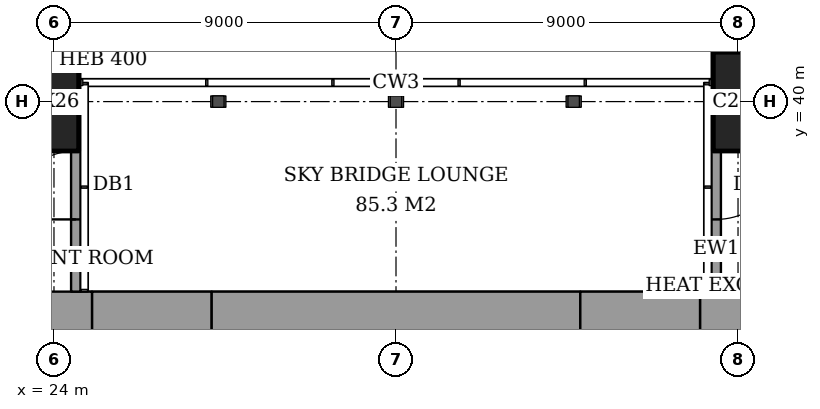
"""IFC4 building model, lengths in metres.
Left out: names, types, materials, properties, quantities, classifications, styles, units other than length and angle.
Written with IfcOpenShell. Run it as: python <this file> out.ifc"""

import sys

from ifc_helpers import new_model, si_unit, direction, frame, frame_2d, origin, origin_2d, place, context, subcontext, project, spatial, rectangle, extrude, element, fill, save


model = new_model("IFC4")
c1 = context("Model", 3, precision=1e-05, world=origin(), true_north=direction((0.0, 1.0)))
c2 = subcontext(c1, "Body", "Model", "MODEL_VIEW")
j1 = project(units=[si_unit("LENGTHUNIT", "METRE"), si_unit("PLANEANGLEUNIT", "RADIAN")], contexts=[c1])
p1 = place(None, origin())
s1 = spatial("IfcSite", under=j1, at=p1, CompositionType="ELEMENT")
p2 = place(p1, origin())
s2 = spatial("IfcBuilding", under=s1, at=p2, CompositionType="ELEMENT")
p3 = place(p2, frame((0.0, 0.0, 177.2)))
s3 = spatial("IfcBuildingStorey", under=s2, at=p3, CompositionType="ELEMENT", Elevation=177.2)
for number, where, z_axis, x_axis in (
    (1, (23.65, 40.0, 0.0), (0.0, 0.0, 1.0), (1.0, 0.0, 0.0)),
    (2, (42.35, 40.0, 0.0), (0.0, 0.0, 1.0), (1.0, 0.0, 0.0)),
):
    element("IfcColumn", number, at=place(p3, frame(where, z_axis=z_axis, x_axis=x_axis)), inside=s3, PredefinedType="COLUMN", context=c2, shape_type="SweptSolid", body=[
        extrude(rectangle(XDim=2.0, YDim=2.6, at=origin_2d()), origin(), (0.0, 0.0, 1.0), 5.0),
    ])
p4 = place(p3, frame((25.0, 34.0, 0.0), z_axis=(0.0, 0.0, 1.0), x_axis=(1.0, 0.0, 0.0)))
e3 = element("IfcWall", 3, at=p4, inside=s3, PredefinedType="SHEAR", context=c2, shape_type="SweptSolid", body=[
    extrude(rectangle(XDim=3.15, YDim=2.0, at=frame_2d((1.575, 0.0))), origin(), (0.0, 0.0, 1.0), 5.0),
])
p5 = place(p3, frame((28.15, 34.0, 0.0), z_axis=(0.0, 0.0, 1.0), x_axis=(1.0, 0.0, 0.0)))
e4 = element("IfcWall", 4, at=p5, inside=s3, PredefinedType="SHEAR", context=c2, shape_type="SweptSolid", body=[
    extrude(rectangle(XDim=9.7, YDim=2.0, at=frame_2d((4.85, 0.0))), origin(), (0.0, 0.0, 1.0), 5.0),
])
p6 = place(p3, frame((37.85, 34.0, 0.0), z_axis=(0.0, 0.0, 1.0), x_axis=(1.0, 0.0, 0.0)))
e5 = element("IfcWall", 5, at=p6, inside=s3, PredefinedType="SHEAR", context=c2, shape_type="SweptSolid", body=[
    extrude(rectangle(XDim=3.15, YDim=2.0, at=frame_2d((1.575, 0.0))), origin(), (0.0, 0.0, 1.0), 5.0),
])
p7 = place(p3, frame((24.3, 23.15, 0.0), z_axis=(0.0, 0.0, 1.0), x_axis=(0.0, 1.0, 0.0)))
e6 = element("IfcWall", 6, at=p7, inside=s3, PredefinedType="SHEAR", context=c2, shape_type="SweptSolid", body=[
    extrude(rectangle(XDim=11.85, YDim=1.4, at=frame_2d((5.925, 0.0))), origin(), (0.0, 0.0, 1.0), 5.0),
])
p8 = place(p7, frame((0.75, 0.0, 0.0)))
e7 = element("IfcOpeningElement", 7, at=p8, cuts=e6, PredefinedType="OPENING", context=c2, shape_type="SweptSolid", body=[
    extrude(rectangle(XDim=1.8, YDim=2.4, at=frame_2d((0.9, 1.2))), frame((0.0, 0.71, 0.0), z_axis=(0.0, -1.0, 0.0), x_axis=(1.0, 0.0, 0.0)), (0.0, 0.0, 1.0), 1.42),
])
p9 = place(p3, frame((41.7, 24.85, 0.0), z_axis=(0.0, 0.0, 1.0), x_axis=(0.0, 1.0, 0.0)))
e8 = element("IfcWall", 8, at=p9, inside=s3, PredefinedType="SHEAR", context=c2, shape_type="SweptSolid", body=[
    extrude(rectangle(XDim=10.15, YDim=1.4, at=frame_2d((5.075, 0.0))), origin(), (0.0, 0.0, 1.0), 5.0),
])
p10 = place(p3, frame((41.425, 40.6, 0.0), z_axis=(0.0, 0.0, 1.0), x_axis=(0.0, -1.0, 0.0)))
e9 = element("IfcWall", 9, at=p10, inside=s3, PredefinedType="SOLIDWALL", context=c2, shape_type="SweptSolid", body=[
    extrude(rectangle(XDim=5.6, YDim=0.25, at=frame_2d((2.8, 0.0))), origin(), (0.0, 0.0, 1.0), 5.0),
])
p11 = place(p10, frame((1.9, 0.0, 0.0)))
e10 = element("IfcOpeningElement", 10, at=p11, cuts=e9, PredefinedType="OPENING", context=c2, shape_type="SweptSolid", body=[
    extrude(rectangle(XDim=1.8, YDim=2.4, at=frame_2d((0.9, 1.2))), frame((0.0, 0.135, 0.0), z_axis=(0.0, -1.0, 0.0), x_axis=(1.0, 0.0, 0.0)), (0.0, 0.0, 1.0), 0.27),
])
p12 = place(p3, frame((24.575, 35.0, 0.0), z_axis=(0.0, 0.0, 1.0), x_axis=(0.0, 1.0, 0.0)))
e11 = element("IfcWall", 11, at=p12, inside=s3, PredefinedType="SOLIDWALL", context=c2, shape_type="SweptSolid", body=[
    extrude(rectangle(XDim=5.6, YDim=0.25, at=frame_2d((2.8, 0.0))), origin(), (0.0, 0.0, 1.0), 5.0),
])
p13 = place(p12, frame((1.9, 0.0, 0.0)))
e12 = element("IfcOpeningElement", 12, at=p13, cuts=e11, PredefinedType="OPENING", context=c2, shape_type="SweptSolid", body=[
    extrude(rectangle(XDim=1.8, YDim=2.4, at=frame_2d((0.9, 1.2))), frame((0.0, 0.135, 0.0), z_axis=(0.0, -1.0, 0.0), x_axis=(1.0, 0.0, 0.0)), (0.0, 0.0, 1.0), 0.27),
])
p14 = place(p11, origin())
e13 = element("IfcDoor", 13, at=p14, inside=s3, OperationType="DOUBLE_DOOR_DOUBLE_SWING", PredefinedType="DOOR", context=c2, shape_type="SweptSolid", body=[
    extrude(rectangle(XDim=1.8, YDim=2.4, at=frame_2d((0.9, 1.2))), frame((0.0, 0.025, 0.0), z_axis=(0.0, -1.0, 0.0), x_axis=(1.0, 0.0, 0.0)), (0.0, 0.0, 1.0), 0.05),
])
fill(e10, e13)
p15 = place(p13, origin())
e14 = element("IfcDoor", 14, at=p15, inside=s3, OperationType="DOUBLE_DOOR_DOUBLE_SWING", PredefinedType="DOOR", context=c2, shape_type="SweptSolid", body=[
    extrude(rectangle(XDim=1.8, YDim=2.4, at=frame_2d((0.9, 1.2))), frame((0.0, 0.025, 0.0), z_axis=(0.0, -1.0, 0.0), x_axis=(1.0, 0.0, 0.0)), (0.0, 0.0, 1.0), 0.05),
])
fill(e12, e14)
save(model, sys.argv[1])
